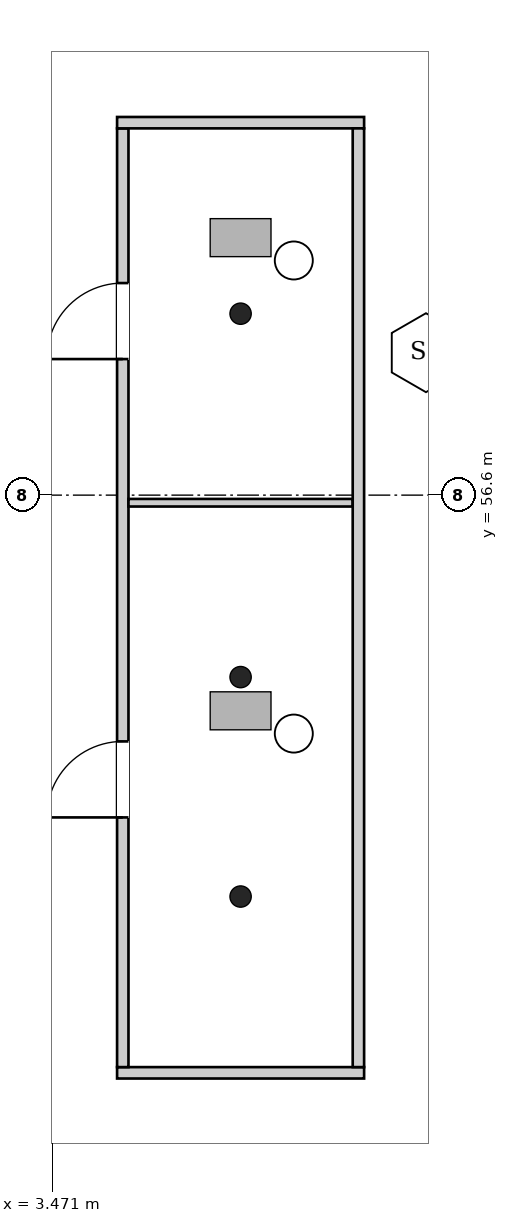
"""IFC4 building model, lengths in metres.
Left out: names, types, materials, properties, quantities, classifications, styles, units other than length and angle.
Written with IfcOpenShell. Run it as: python <this file> out.ifc"""

import sys

from ifc_helpers import new_model, si_unit, direction, frame, frame_2d, origin, place, context, subcontext, project, spatial, rectangle, extrude, element, fill, save


model = new_model("IFC4")
c1 = context("Model", 3, precision=1e-05, world=origin(), true_north=direction((0.0, 1.0)))
c2 = subcontext(c1, "Body", "Model", "MODEL_VIEW")
j1 = project(units=[si_unit("LENGTHUNIT", "METRE"), si_unit("PLANEANGLEUNIT", "RADIAN")], contexts=[c1])
p1 = place(None, origin())
s1 = spatial("IfcSite", under=j1, at=p1, CompositionType="ELEMENT")
p2 = place(p1, origin())
s2 = spatial("IfcBuilding", under=s1, at=p2, CompositionType="ELEMENT")
p3 = place(p2, frame((0.0, 0.0, 14.2)))
s3 = spatial("IfcBuildingStorey", under=s2, at=p3, CompositionType="ELEMENT", Elevation=14.2)
p4 = place(p3, frame((4.325, 49.0, 0.0), z_axis=(0.0, 0.0, 1.0), x_axis=(1.0, 0.0, 0.0)))
e1 = element("IfcWall", 1, at=p4, inside=s3, PredefinedType="PARTITIONING", context=c2, shape_type="SweptSolid", body=[
    extrude(rectangle(XDim=3.25, YDim=0.15, at=frame_2d((1.625, 0.0))), origin(), (0.0, 0.0, 1.0), 7.15),
])
p5 = place(p3, frame((4.4, 49.075, 0.0), z_axis=(0.0, 0.0, 1.0), x_axis=(0.0, 1.0, 0.0)))
e2 = element("IfcWall", 2, at=p5, inside=s3, PredefinedType="PARTITIONING", context=c2, shape_type="SweptSolid", body=[
    extrude(rectangle(XDim=12.35, YDim=0.15, at=frame_2d((6.175, 0.0))), origin(), (0.0, 0.0, 1.0), 7.15),
])
p6 = place(p5, frame((3.285, 0.0, 0.0)))
e3 = element("IfcOpeningElement", 3, at=p6, cuts=e2, PredefinedType="OPENING", context=c2, shape_type="SweptSolid", body=[
    extrude(rectangle(XDim=1.0, YDim=2.1, at=frame_2d((0.5, 1.05))), frame((0.0, 0.085, 0.0), z_axis=(0.0, -1.0, 0.0), x_axis=(1.0, 0.0, 0.0)), (0.0, 0.0, 1.0), 0.17),
])
p7 = place(p5, frame((9.315, 0.0, 0.0)))
e4 = element("IfcOpeningElement", 4, at=p7, cuts=e2, PredefinedType="OPENING", context=c2, shape_type="SweptSolid", body=[
    extrude(rectangle(XDim=1.0, YDim=2.1, at=frame_2d((0.5, 1.05))), frame((0.0, 0.085, 0.0), z_axis=(0.0, -1.0, 0.0), x_axis=(1.0, 0.0, 0.0)), (0.0, 0.0, 1.0), 0.17),
])
p8 = place(p3, frame((4.325, 61.5, 0.0), z_axis=(0.0, 0.0, 1.0), x_axis=(1.0, 0.0, 0.0)))
e5 = element("IfcWall", 5, at=p8, inside=s3, PredefinedType="PARTITIONING", context=c2, shape_type="SweptSolid", body=[
    extrude(rectangle(XDim=3.25, YDim=0.15, at=frame_2d((1.625, 0.0))), origin(), (0.0, 0.0, 1.0), 7.15),
])
p9 = place(p3, frame((4.475, 56.5, 0.0), z_axis=(0.0, 0.0, 1.0), x_axis=(1.0, 0.0, 0.0)))
e6 = element("IfcWall", 6, at=p9, inside=s3, PredefinedType="PARTITIONING", context=c2, shape_type="SweptSolid", body=[
    extrude(rectangle(XDim=2.95, YDim=0.1, at=frame_2d((1.475, 0.0))), origin(), (0.0, 0.0, 1.0), 6.75),
])
p10 = place(p3, frame((7.5, 49.075, 0.0), z_axis=(0.0, 0.0, 1.0), x_axis=(0.0, 1.0, 0.0)))
e7 = element("IfcWall", 7, at=p10, inside=s3, PredefinedType="PARTITIONING", context=c2, shape_type="SweptSolid", body=[
    extrude(rectangle(XDim=12.35, YDim=0.15, at=frame_2d((6.175, 0.0))), origin(), (0.0, 0.0, 1.0), 7.15),
])
p11 = place(p6, origin())
e8 = element("IfcDoor", 8, at=p11, inside=s3, OperationType="SINGLE_SWING_RIGHT", PredefinedType="DOOR", context=c2, shape_type="SweptSolid", body=[
    extrude(rectangle(XDim=1.0, YDim=2.1, at=frame_2d((0.5, 1.05))), frame((0.0, 0.025, 0.0), z_axis=(0.0, -1.0, 0.0), x_axis=(1.0, 0.0, 0.0)), (0.0, 0.0, 1.0), 0.05),
])
fill(e3, e8)
p12 = place(p7, origin())
e9 = element("IfcDoor", 9, at=p12, inside=s3, OperationType="SINGLE_SWING_LEFT", PredefinedType="DOOR", context=c2, shape_type="SweptSolid", body=[
    extrude(rectangle(XDim=1.0, YDim=2.1, at=frame_2d((0.5, 1.05))), frame((0.0, 0.025, 0.0), z_axis=(0.0, -1.0, 0.0), x_axis=(1.0, 0.0, 0.0)), (0.0, 0.0, 1.0), 0.05),
])
fill(e4, e9)
save(model, sys.argv[1])
